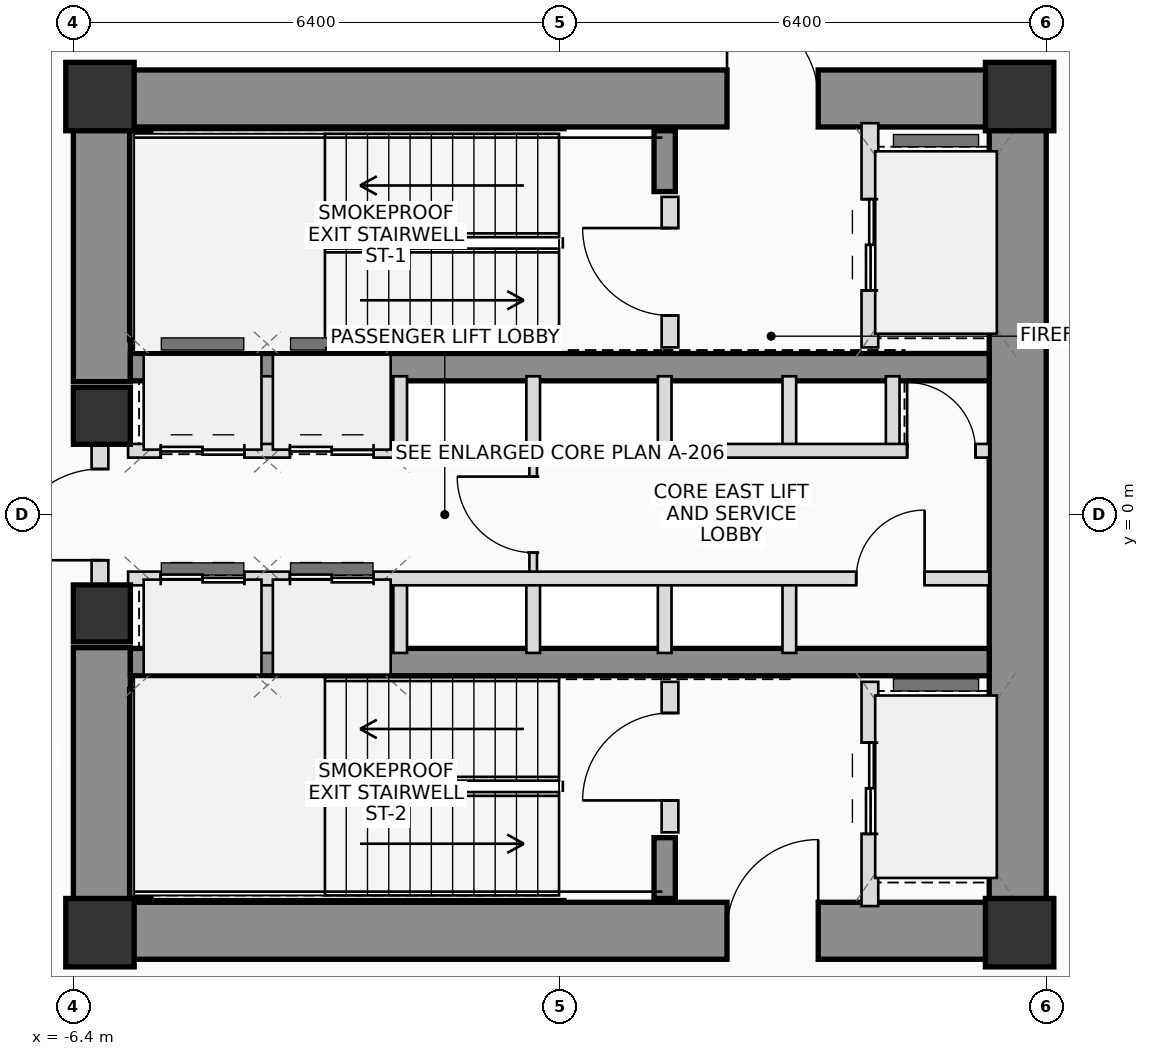
"""IFC4 building model, lengths in metres.
Left out: names, types, materials, properties, quantities, classifications, styles, units other than length and angle.
Written with IfcOpenShell. Run it as: python <this file> out.ifc"""

import sys

from ifc_helpers import new_model, si_unit, direction, frame, frame_2d, origin, origin_2d, place, context, subcontext, project, spatial, rectangle, extrude, source, transform, mapped, element, fill, save


model = new_model("IFC4")
c1 = context("Model", 3, precision=1e-05, world=origin(), true_north=direction((0.0, 1.0)))
c2 = subcontext(c1, "Body", "Model", "MODEL_VIEW")
j1 = project(units=[si_unit("LENGTHUNIT", "METRE"), si_unit("PLANEANGLEUNIT", "RADIAN")], contexts=[c1])
p1 = place(None, origin())
s1 = spatial("IfcSite", under=j1, at=p1, CompositionType="ELEMENT")
p2 = place(p1, origin())
s2 = spatial("IfcBuilding", under=s1, at=p2, CompositionType="ELEMENT")
p3 = place(p2, frame((0.0, 0.0, 62.3)))
s3 = spatial("IfcBuildingStorey", under=s2, at=p3, CompositionType="ELEMENT", Elevation=62.3)
m1 = source(origin(), c2, "Body", "SweptSolid", [
    extrude(rectangle(XDim=0.9, YDim=0.9, at=origin_2d()), origin(), (0.0, 0.0, 1.0), 3.75),
])
for number, where, z_axis, x_axis in (
    (1, (-6.05, -5.5, 0.0), (0.0, 0.0, 1.0), (1.0, 0.0, 0.0)),
    (2, (6.05, -5.5, 0.0), (0.0, 0.0, 1.0), (1.0, 0.0, 0.0)),
    (3, (6.05, 5.5, 0.0), (0.0, 0.0, 1.0), (1.0, 0.0, 0.0)),
    (4, (-6.05, 5.5, 0.0), (0.0, 0.0, 1.0), (1.0, 0.0, 0.0)),
):
    element("IfcColumn", number, at=place(p3, frame(where, z_axis=z_axis, x_axis=x_axis)), inside=s3, PredefinedType="COLUMN", context=c2, shape_type="MappedRepresentation", body=[
        mapped(m1, transform((0.0, 0.0, 0.0), scale=1.0)),
    ])
p4 = place(p3, frame((-6.4, 5.475, 0.0), z_axis=(0.0, 0.0, 1.0), x_axis=(1.0, 0.0, 0.0)))
e5 = element("IfcWall", 5, at=p4, inside=s3, PredefinedType="SHEAR", context=c2, shape_type="SweptSolid", body=[
    extrude(rectangle(XDim=12.8, YDim=0.75, at=frame_2d((6.4, 0.0))), origin(), (0.0, 0.0, 1.0), 3.75),
])
p5 = place(p4, frame((8.6, 0.0, 0.0)))
e6 = element("IfcOpeningElement", 6, at=p5, cuts=e5, PredefinedType="OPENING", context=c2, shape_type="SweptSolid", body=[
    extrude(rectangle(XDim=1.2, YDim=2.2, at=frame_2d((0.6, 1.1))), frame((0.0, 0.385, 0.0), z_axis=(0.0, -1.0, 0.0), x_axis=(1.0, 0.0, 0.0)), (0.0, 0.0, 1.0), 0.77),
])
p6 = place(p3, frame((-6.4, -5.475, 0.0), z_axis=(0.0, 0.0, 1.0), x_axis=(1.0, 0.0, 0.0)))
e7 = element("IfcWall", 7, at=p6, inside=s3, PredefinedType="SHEAR", context=c2, shape_type="SweptSolid", body=[
    extrude(rectangle(XDim=12.8, YDim=0.75, at=frame_2d((6.4, 0.0))), origin(), (0.0, 0.0, 1.0), 3.75),
])
p7 = place(p6, frame((8.6, 0.0, 0.0)))
e8 = element("IfcOpeningElement", 8, at=p7, cuts=e7, PredefinedType="OPENING", context=c2, shape_type="SweptSolid", body=[
    extrude(rectangle(XDim=1.2, YDim=2.2, at=frame_2d((0.6, 1.1))), frame((0.0, 0.385, 0.0), z_axis=(0.0, -1.0, 0.0), x_axis=(1.0, 0.0, 0.0)), (0.0, 0.0, 1.0), 0.77),
])
p8 = place(p3, frame((6.025, -5.1, 0.0), z_axis=(0.0, 0.0, 1.0), x_axis=(0.0, 1.0, 0.0)))
e9 = element("IfcWall", 9, at=p8, inside=s3, PredefinedType="SHEAR", context=c2, shape_type="SweptSolid", body=[
    extrude(rectangle(XDim=10.2, YDim=0.75, at=frame_2d((5.1, 0.0))), origin(), (0.0, 0.0, 1.0), 3.75),
])
for number, where, z_axis, x_axis in (
    (10, (-6.025, -5.1, 0.0), (0.0, 0.0, 1.0), (0.0, 1.0, 0.0)),
    (11, (-6.025, 1.75, 0.0), (0.0, 0.0, 1.0), (0.0, 1.0, 0.0)),
):
    element("IfcWall", number, at=place(p3, frame(where, z_axis=z_axis, x_axis=x_axis)), inside=s3, PredefinedType="SHEAR", context=c2, shape_type="SweptSolid", body=[
        extrude(rectangle(XDim=3.35, YDim=0.75, at=frame_2d((1.675, 0.0))), origin(), (0.0, 0.0, 1.0), 3.75),
    ])
for number, where, z_axis, x_axis in (
    (12, (-5.65, 1.94, 0.0), (0.0, 0.0, 1.0), (1.0, 0.0, 0.0)),
    (13, (-5.65, -1.94, 0.0), (0.0, 0.0, 1.0), (1.0, 0.0, 0.0)),
):
    element("IfcWall", number, at=place(p3, frame(where, z_axis=z_axis, x_axis=x_axis)), inside=s3, PredefinedType="SHEAR", context=c2, shape_type="SweptSolid", body=[
        extrude(rectangle(XDim=11.3, YDim=0.36, at=frame_2d((5.65, 0.0))), origin(), (0.0, 0.0, 1.0), 3.75),
    ])
p9 = place(p3, frame((-5.52, 2.3, 0.0), z_axis=(0.0, 0.0, 1.0), x_axis=(0.0, 1.0, 0.0)))
e14 = element("IfcWall", 14, at=p9, inside=s3, PredefinedType="SHEAR", context=c2, shape_type="SweptSolid", body=[
    extrude(rectangle(XDim=2.75, YDim=0.28, at=frame_2d((1.375, 0.0))), origin(), (0.0, 0.0, 1.0), 3.75),
])
p10 = place(p3, frame((1.38, 4.25, 0.0), z_axis=(0.0, 0.0, 1.0), x_axis=(0.0, 1.0, 0.0)))
e15 = element("IfcWall", 15, at=p10, inside=s3, PredefinedType="SHEAR", context=c2, shape_type="SweptSolid", body=[
    extrude(rectangle(XDim=0.8, YDim=0.28, at=frame_2d((0.4, 0.0))), origin(), (0.0, 0.0, 1.0), 3.75),
])
p11 = place(p3, frame((-5.52, -5.05, 0.0), z_axis=(0.0, 0.0, 1.0), x_axis=(0.0, 1.0, 0.0)))
e16 = element("IfcWall", 16, at=p11, inside=s3, PredefinedType="SHEAR", context=c2, shape_type="SweptSolid", body=[
    extrude(rectangle(XDim=2.75, YDim=0.28, at=frame_2d((1.375, 0.0))), origin(), (0.0, 0.0, 1.0), 3.75),
])
p12 = place(p3, frame((1.38, -5.05, 0.0), z_axis=(0.0, 0.0, 1.0), x_axis=(0.0, 1.0, 0.0)))
e17 = element("IfcWall", 17, at=p12, inside=s3, PredefinedType="SHEAR", context=c2, shape_type="SweptSolid", body=[
    extrude(rectangle(XDim=0.8, YDim=0.28, at=frame_2d((0.4, 0.0))), origin(), (0.0, 0.0, 1.0), 3.75),
])
m2 = source(origin(), c2, "Body", "SweptSolid", [
    extrude(rectangle(XDim=0.75, YDim=0.75, at=origin_2d()), origin(), (0.0, 0.0, 1.0), 3.75),
])
for number, where, z_axis, x_axis in (
    (18, (-6.025, -1.3, 0.0), (0.0, 0.0, 1.0), (1.0, 0.0, 0.0)),
    (19, (-6.025, 1.3, 0.0), (0.0, 0.0, 1.0), (1.0, 0.0, 0.0)),
):
    element("IfcColumn", number, at=place(p3, frame(where, z_axis=z_axis, x_axis=x_axis)), inside=s3, PredefinedType="COLUMN", context=c2, shape_type="MappedRepresentation", body=[
        mapped(m2, transform((0.0, 0.0, 0.0), scale=1.0)),
    ])
p13 = place(p3, frame((-6.05, -0.95, 0.0), z_axis=(0.0, 0.0, 1.0), x_axis=(0.0, 1.0, 0.0)))
e20 = element("IfcWall", 20, at=p13, inside=s3, PredefinedType="PLUMBINGWALL", context=c2, shape_type="SweptSolid", body=[
    extrude(rectangle(XDim=1.9, YDim=0.22, at=frame_2d((0.95, 0.0))), origin(), (0.0, 0.0, 1.0), 2.525),
])
p14 = place(p13, frame((0.35, 0.0, 0.0)))
e21 = element("IfcOpeningElement", 21, at=p14, cuts=e20, PredefinedType="OPENING", context=c2, shape_type="SweptSolid", body=[
    extrude(rectangle(XDim=1.2, YDim=2.2, at=frame_2d((0.6, 1.1))), frame((0.0, 0.12, 0.0), z_axis=(0.0, -1.0, 0.0), x_axis=(1.0, 0.0, 0.0)), (0.0, 0.0, 1.0), 0.24),
])
p15 = place(p3, frame((1.45, 2.2, 0.0), z_axis=(0.0, 0.0, 1.0), x_axis=(0.0, 1.0, 0.0)))
e22 = element("IfcWall", 22, at=p15, inside=s3, PredefinedType="PLUMBINGWALL", context=c2, shape_type="SweptSolid", body=[
    extrude(rectangle(XDim=1.98, YDim=0.22, at=frame_2d((0.99, 0.0))), origin(), (0.0, 0.0, 1.0), 3.545),
])
p16 = place(p15, frame((0.42, 0.0, 0.0)))
e23 = element("IfcOpeningElement", 23, at=p16, cuts=e22, PredefinedType="OPENING", context=c2, shape_type="SweptSolid", body=[
    extrude(rectangle(XDim=1.15, YDim=2.15, at=frame_2d((0.575, 1.075))), frame((0.0, 0.12, 0.0), z_axis=(0.0, -1.0, 0.0), x_axis=(1.0, 0.0, 0.0)), (0.0, 0.0, 1.0), 0.24),
])
p17 = place(p3, frame((4.08, 2.2, 0.0), z_axis=(0.0, 0.0, 1.0), x_axis=(0.0, 1.0, 0.0)))
e24 = element("IfcWall", 24, at=p17, inside=s3, PredefinedType="PLUMBINGWALL", context=c2, shape_type="SweptSolid", body=[
    extrude(rectangle(XDim=2.95, YDim=0.22, at=frame_2d((1.475, 0.0))), origin(), (0.0, 0.0, 1.0), 3.545),
])
p18 = place(p17, frame((0.75, 0.0, 0.0)))
e25 = element("IfcOpeningElement", 25, at=p18, cuts=e24, PredefinedType="OPENING", context=c2, shape_type="SweptSolid", body=[
    extrude(rectangle(XDim=1.2, YDim=2.25, at=frame_2d((0.6, 1.125))), frame((0.0, 0.12, 0.0), z_axis=(0.0, -1.0, 0.0), x_axis=(1.0, 0.0, 0.0)), (0.0, 0.0, 1.0), 0.24),
])
p19 = place(p3, frame((1.45, -4.18, 0.0), z_axis=(0.0, 0.0, 1.0), x_axis=(0.0, 1.0, 0.0)))
e26 = element("IfcWall", 26, at=p19, inside=s3, PredefinedType="PLUMBINGWALL", context=c2, shape_type="SweptSolid", body=[
    extrude(rectangle(XDim=1.98, YDim=0.22, at=frame_2d((0.99, 0.0))), origin(), (0.0, 0.0, 1.0), 3.545),
])
p20 = place(p19, frame((0.42, 0.0, 0.0)))
e27 = element("IfcOpeningElement", 27, at=p20, cuts=e26, PredefinedType="OPENING", context=c2, shape_type="SweptSolid", body=[
    extrude(rectangle(XDim=1.15, YDim=2.15, at=frame_2d((0.575, 1.075))), frame((0.0, 0.12, 0.0), z_axis=(0.0, -1.0, 0.0), x_axis=(1.0, 0.0, 0.0)), (0.0, 0.0, 1.0), 0.24),
])
p21 = place(p3, frame((4.08, -5.15, 0.0), z_axis=(0.0, 0.0, 1.0), x_axis=(0.0, 1.0, 0.0)))
e28 = element("IfcWall", 28, at=p21, inside=s3, PredefinedType="PLUMBINGWALL", context=c2, shape_type="SweptSolid", body=[
    extrude(rectangle(XDim=2.95, YDim=0.22, at=frame_2d((1.475, 0.0))), origin(), (0.0, 0.0, 1.0), 3.545),
])
p22 = place(p21, frame((0.95, 0.0, 0.0)))
e29 = element("IfcOpeningElement", 29, at=p22, cuts=e28, PredefinedType="OPENING", context=c2, shape_type="SweptSolid", body=[
    extrude(rectangle(XDim=1.2, YDim=2.25, at=frame_2d((0.6, 1.125))), frame((0.0, 0.12, 0.0), z_axis=(0.0, -1.0, 0.0), x_axis=(1.0, 0.0, 0.0)), (0.0, 0.0, 1.0), 0.24),
])
p23 = place(p3, frame((-0.35, -0.84, 0.0), z_axis=(0.0, 0.0, 1.0), x_axis=(0.0, 1.0, 0.0)))
e30 = element("IfcWall", 30, at=p23, inside=s3, PredefinedType="PARTITIONING", context=c2, shape_type="SweptSolid", body=[
    extrude(rectangle(XDim=1.68, YDim=0.1, at=frame_2d((0.84, 0.0))), origin(), (0.0, 0.0, 1.0), 3.545),
])
p24 = place(p23, frame((0.34, 0.0, 0.0)))
e31 = element("IfcOpeningElement", 31, at=p24, cuts=e30, PredefinedType="OPENING", context=c2, shape_type="SweptSolid", body=[
    extrude(rectangle(XDim=1.0, YDim=2.25, at=frame_2d((0.5, 1.125))), frame((0.0, 0.06, 0.0), z_axis=(0.0, -1.0, 0.0), x_axis=(1.0, 0.0, 0.0)), (0.0, 0.0, 1.0), 0.12),
])
for number, where, z_axis, x_axis in (
    (32, (-3.85, 0.84, 0.0), (0.0, 0.0, 1.0), (0.0, 1.0, 0.0)),
    (33, (-3.85, -1.82, 0.0), (0.0, 0.0, 1.0), (0.0, 1.0, 0.0)),
    (34, (-2.1, 0.84, 0.0), (0.0, 0.0, 1.0), (0.0, 1.0, 0.0)),
    (35, (-2.1, -1.82, 0.0), (0.0, 0.0, 1.0), (0.0, 1.0, 0.0)),
    (36, (-0.35, 0.84, 0.0), (0.0, 0.0, 1.0), (0.0, 1.0, 0.0)),
    (37, (-0.35, -1.82, 0.0), (0.0, 0.0, 1.0), (0.0, 1.0, 0.0)),
    (38, (1.38, 0.84, 0.0), (0.0, 0.0, 1.0), (0.0, 1.0, 0.0)),
    (39, (1.38, -1.82, 0.0), (0.0, 0.0, 1.0), (0.0, 1.0, 0.0)),
    (40, (3.02, 0.84, 0.0), (0.0, 0.0, 1.0), (0.0, 1.0, 0.0)),
    (41, (4.38, 0.84, 0.0), (0.0, 0.0, 1.0), (0.0, 1.0, 0.0)),
    (42, (3.02, -1.82, 0.0), (0.0, 0.0, 1.0), (0.0, 1.0, 0.0)),
):
    element("IfcWall", number, at=place(p3, frame(where, z_axis=z_axis, x_axis=x_axis)), inside=s3, PredefinedType="PLUMBINGWALL", context=c2, shape_type="SweptSolid", body=[
        extrude(rectangle(XDim=0.98, YDim=0.18, at=frame_2d((0.49, 0.0))), origin(), (0.0, 0.0, 1.0), 3.545),
    ])
p25 = place(p3, frame((-5.68, 0.84, 0.0), z_axis=(0.0, 0.0, 1.0), x_axis=(1.0, 0.0, 0.0)))
e43 = element("IfcWall", 43, at=p25, inside=s3, PredefinedType="PLUMBINGWALL", context=c2, shape_type="SweptSolid", body=[
    extrude(rectangle(XDim=11.33, YDim=0.18, at=frame_2d((5.665, 0.0))), origin(), (0.0, 0.0, 1.0), 3.545),
])
p26 = place(p25, frame((0.43, 0.0, 0.0)))
e44 = element("IfcOpeningElement", 44, at=p26, cuts=e43, PredefinedType="OPENING", context=c2, shape_type="SweptSolid", body=[
    extrude(rectangle(XDim=1.1, YDim=2.2, at=frame_2d((0.55, 1.1))), frame((0.0, 0.1, 0.0), z_axis=(0.0, -1.0, 0.0), x_axis=(1.0, 0.0, 0.0)), (0.0, 0.0, 1.0), 0.2),
])
p27 = place(p25, frame((2.13, 0.0, 0.0)))
e45 = element("IfcOpeningElement", 45, at=p27, cuts=e43, PredefinedType="OPENING", context=c2, shape_type="SweptSolid", body=[
    extrude(rectangle(XDim=1.1, YDim=2.2, at=frame_2d((0.55, 1.1))), frame((0.0, 0.1, 0.0), z_axis=(0.0, -1.0, 0.0), x_axis=(1.0, 0.0, 0.0)), (0.0, 0.0, 1.0), 0.2),
])
p28 = place(p25, frame((10.25, 0.0, 0.0)))
e46 = element("IfcOpeningElement", 46, at=p28, cuts=e43, PredefinedType="OPENING", context=c2, shape_type="SweptSolid", body=[
    extrude(rectangle(XDim=0.9, YDim=2.05, at=frame_2d((0.45, 1.025))), frame((0.0, 0.1, 0.0), z_axis=(0.0, -1.0, 0.0), x_axis=(1.0, 0.0, 0.0)), (0.0, 0.0, 1.0), 0.2),
])
p29 = place(p3, frame((-5.68, -0.84, 0.0), z_axis=(0.0, 0.0, 1.0), x_axis=(1.0, 0.0, 0.0)))
e47 = element("IfcWall", 47, at=p29, inside=s3, PredefinedType="PLUMBINGWALL", context=c2, shape_type="SweptSolid", body=[
    extrude(rectangle(XDim=11.33, YDim=0.18, at=frame_2d((5.665, 0.0))), origin(), (0.0, 0.0, 1.0), 3.545),
])
p30 = place(p29, frame((0.43, 0.0, 0.0)))
e48 = element("IfcOpeningElement", 48, at=p30, cuts=e47, PredefinedType="OPENING", context=c2, shape_type="SweptSolid", body=[
    extrude(rectangle(XDim=1.1, YDim=2.2, at=frame_2d((0.55, 1.1))), frame((0.0, 0.1, 0.0), z_axis=(0.0, -1.0, 0.0), x_axis=(1.0, 0.0, 0.0)), (0.0, 0.0, 1.0), 0.2),
])
p31 = place(p29, frame((2.13, 0.0, 0.0)))
e49 = element("IfcOpeningElement", 49, at=p31, cuts=e47, PredefinedType="OPENING", context=c2, shape_type="SweptSolid", body=[
    extrude(rectangle(XDim=1.1, YDim=2.2, at=frame_2d((0.55, 1.1))), frame((0.0, 0.1, 0.0), z_axis=(0.0, -1.0, 0.0), x_axis=(1.0, 0.0, 0.0)), (0.0, 0.0, 1.0), 0.2),
])
p32 = place(p29, frame((9.58, 0.0, 0.0)))
e50 = element("IfcOpeningElement", 50, at=p32, cuts=e47, PredefinedType="OPENING", context=c2, shape_type="SweptSolid", body=[
    extrude(rectangle(XDim=0.9, YDim=2.05, at=frame_2d((0.45, 1.025))), frame((0.0, 0.1, 0.0), z_axis=(0.0, -1.0, 0.0), x_axis=(1.0, 0.0, 0.0)), (0.0, 0.0, 1.0), 0.2),
])
p33 = place(p5, origin())
e51 = element("IfcDoor", 51, at=p33, inside=s3, OperationType="SINGLE_SWING_LEFT", PredefinedType="DOOR", context=c2, shape_type="SweptSolid", body=[
    extrude(rectangle(XDim=1.2, YDim=2.2, at=frame_2d((0.6, 1.1))), frame((0.0, 0.025, 0.0), z_axis=(0.0, -1.0, 0.0), x_axis=(1.0, 0.0, 0.0)), (0.0, 0.0, 1.0), 0.05),
])
fill(e6, e51)
p34 = place(p7, origin())
e52 = element("IfcDoor", 52, at=p34, inside=s3, OperationType="SINGLE_SWING_RIGHT", PredefinedType="DOOR", context=c2, shape_type="SweptSolid", body=[
    extrude(rectangle(XDim=1.2, YDim=2.2, at=frame_2d((0.6, 1.1))), frame((0.0, 0.025, 0.0), z_axis=(0.0, -1.0, 0.0), x_axis=(1.0, 0.0, 0.0)), (0.0, 0.0, 1.0), 0.05),
])
fill(e8, e52)
p35 = place(p14, origin())
e53 = element("IfcDoor", 53, at=p35, inside=s3, OperationType="SINGLE_SWING_LEFT", PredefinedType="DOOR", context=c2, shape_type="SweptSolid", body=[
    extrude(rectangle(XDim=1.2, YDim=2.2, at=frame_2d((0.6, 1.1))), frame((0.0, 0.025, 0.0), z_axis=(0.0, -1.0, 0.0), x_axis=(1.0, 0.0, 0.0)), (0.0, 0.0, 1.0), 0.05),
])
fill(e21, e53)
p36 = place(p16, origin())
e54 = element("IfcDoor", 54, at=p36, inside=s3, OperationType="SINGLE_SWING_RIGHT", PredefinedType="DOOR", context=c2, shape_type="SweptSolid", body=[
    extrude(rectangle(XDim=1.15, YDim=2.15, at=frame_2d((0.575, 1.075))), frame((0.0, 0.025, 0.0), z_axis=(0.0, -1.0, 0.0), x_axis=(1.0, 0.0, 0.0)), (0.0, 0.0, 1.0), 0.05),
])
fill(e23, e54)
p37 = place(p18, origin())
e55 = element("IfcDoor", 55, at=p37, inside=s3, OperationType="DOUBLE_DOOR_SLIDING", PredefinedType="DOOR", context=c2, shape_type="SweptSolid", body=[
    extrude(rectangle(XDim=1.2, YDim=2.25, at=frame_2d((0.6, 1.125))), frame((0.0, 0.025, 0.0), z_axis=(0.0, -1.0, 0.0), x_axis=(1.0, 0.0, 0.0)), (0.0, 0.0, 1.0), 0.05),
])
fill(e25, e55)
p38 = place(p20, origin())
e56 = element("IfcDoor", 56, at=p38, inside=s3, OperationType="SINGLE_SWING_LEFT", PredefinedType="DOOR", context=c2, shape_type="SweptSolid", body=[
    extrude(rectangle(XDim=1.15, YDim=2.15, at=frame_2d((0.575, 1.075))), frame((0.0, 0.025, 0.0), z_axis=(0.0, -1.0, 0.0), x_axis=(1.0, 0.0, 0.0)), (0.0, 0.0, 1.0), 0.05),
])
fill(e27, e56)
p39 = place(p22, origin())
e57 = element("IfcDoor", 57, at=p39, inside=s3, OperationType="DOUBLE_DOOR_SLIDING", PredefinedType="DOOR", context=c2, shape_type="SweptSolid", body=[
    extrude(rectangle(XDim=1.2, YDim=2.25, at=frame_2d((0.6, 1.125))), frame((0.0, 0.025, 0.0), z_axis=(0.0, -1.0, 0.0), x_axis=(1.0, 0.0, 0.0)), (0.0, 0.0, 1.0), 0.05),
])
fill(e29, e57)
p40 = place(p24, origin())
e58 = element("IfcDoor", 58, at=p40, inside=s3, OperationType="SINGLE_SWING_RIGHT", PredefinedType="DOOR", context=c2, shape_type="SweptSolid", body=[
    extrude(rectangle(XDim=1.0, YDim=2.25, at=frame_2d((0.5, 1.125))), frame((0.0, 0.025, 0.0), z_axis=(0.0, -1.0, 0.0), x_axis=(1.0, 0.0, 0.0)), (0.0, 0.0, 1.0), 0.05),
])
fill(e31, e58)
p41 = place(p26, origin())
e59 = element("IfcDoor", 59, at=p41, inside=s3, OperationType="DOUBLE_DOOR_SLIDING", PredefinedType="DOOR", context=c2, shape_type="SweptSolid", body=[
    extrude(rectangle(XDim=1.1, YDim=2.2, at=frame_2d((0.55, 1.1))), frame((0.0, 0.025, 0.0), z_axis=(0.0, -1.0, 0.0), x_axis=(1.0, 0.0, 0.0)), (0.0, 0.0, 1.0), 0.05),
])
fill(e44, e59)
p42 = place(p27, origin())
e60 = element("IfcDoor", 60, at=p42, inside=s3, OperationType="DOUBLE_DOOR_SLIDING", PredefinedType="DOOR", context=c2, shape_type="SweptSolid", body=[
    extrude(rectangle(XDim=1.1, YDim=2.2, at=frame_2d((0.55, 1.1))), frame((0.0, 0.025, 0.0), z_axis=(0.0, -1.0, 0.0), x_axis=(1.0, 0.0, 0.0)), (0.0, 0.0, 1.0), 0.05),
])
fill(e45, e60)
p43 = place(p28, origin())
e61 = element("IfcDoor", 61, at=p43, inside=s3, OperationType="SINGLE_SWING_LEFT", PredefinedType="DOOR", context=c2, shape_type="SweptSolid", body=[
    extrude(rectangle(XDim=0.9, YDim=2.05, at=frame_2d((0.45, 1.025))), frame((0.0, 0.025, 0.0), z_axis=(0.0, -1.0, 0.0), x_axis=(1.0, 0.0, 0.0)), (0.0, 0.0, 1.0), 0.05),
])
fill(e46, e61)
p44 = place(p30, origin())
e62 = element("IfcDoor", 62, at=p44, inside=s3, OperationType="DOUBLE_DOOR_SLIDING", PredefinedType="DOOR", context=c2, shape_type="SweptSolid", body=[
    extrude(rectangle(XDim=1.1, YDim=2.2, at=frame_2d((0.55, 1.1))), frame((0.0, 0.025, 0.0), z_axis=(0.0, -1.0, 0.0), x_axis=(1.0, 0.0, 0.0)), (0.0, 0.0, 1.0), 0.05),
])
fill(e48, e62)
p45 = place(p31, origin())
e63 = element("IfcDoor", 63, at=p45, inside=s3, OperationType="DOUBLE_DOOR_SLIDING", PredefinedType="DOOR", context=c2, shape_type="SweptSolid", body=[
    extrude(rectangle(XDim=1.1, YDim=2.2, at=frame_2d((0.55, 1.1))), frame((0.0, 0.025, 0.0), z_axis=(0.0, -1.0, 0.0), x_axis=(1.0, 0.0, 0.0)), (0.0, 0.0, 1.0), 0.05),
])
fill(e49, e63)
p46 = place(p32, origin())
e64 = element("IfcDoor", 64, at=p46, inside=s3, OperationType="SINGLE_SWING_RIGHT", PredefinedType="DOOR", context=c2, shape_type="SweptSolid", body=[
    extrude(rectangle(XDim=0.9, YDim=2.05, at=frame_2d((0.45, 1.025))), frame((0.0, 0.025, 0.0), z_axis=(0.0, -1.0, 0.0), x_axis=(1.0, 0.0, 0.0)), (0.0, 0.0, 1.0), 0.05),
])
fill(e50, e64)
save(model, sys.argv[1])
